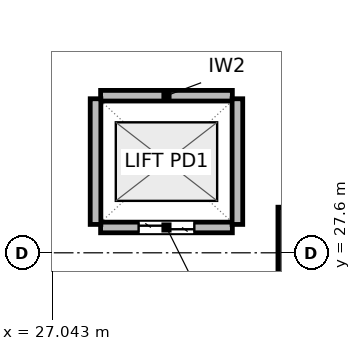
"""IFC4 building model, lengths in metres.
Left out: names, types, materials, properties, quantities, classifications, styles, units other than length and angle.
Written with IfcOpenShell. Run it as: python <this file> out.ifc"""

import sys

from ifc_helpers import new_model, si_unit, direction, frame, frame_2d, origin, origin_2d, place, context, subcontext, project, spatial, rectangle, extrude, element, fill, save


model = new_model("IFC4")
c1 = context("Model", 3, precision=1e-05, world=origin(), true_north=direction((0.0, 1.0)))
c2 = subcontext(c1, "Body", "Model", "MODEL_VIEW")
j1 = project(units=[si_unit("LENGTHUNIT", "METRE"), si_unit("PLANEANGLEUNIT", "RADIAN")], contexts=[c1])
p1 = place(None, origin())
s1 = spatial("IfcSite", under=j1, at=p1, CompositionType="ELEMENT")
p2 = place(p1, origin())
s2 = spatial("IfcBuilding", under=s1, at=p2, CompositionType="ELEMENT")
p3 = place(p2, frame((0.0, 0.0, 12.9)))
s3 = spatial("IfcBuildingStorey", under=s2, at=p3, CompositionType="ELEMENT", Elevation=12.9)
p4 = place(p3, frame((32.4, 27.6, 0.0), z_axis=(0.0, 0.0, 1.0), x_axis=(1.0, 0.0, 0.0)))
e1 = element("IfcColumn", 1, at=p4, inside=s3, PredefinedType="COLUMN", context=c2, shape_type="SweptSolid", body=[
    extrude(rectangle(XDim=1.8, YDim=1.8, at=origin_2d()), origin(), (0.0, 0.0, 1.0), 4.2),
])
p5 = place(p3, frame((28.0, 28.1, 0.0), z_axis=(0.0, 0.0, 1.0), x_axis=(1.0, 0.0, 0.0)))
e2 = element("IfcWall", 2, at=p5, inside=s3, PredefinedType="PARTITIONING", context=c2, shape_type="SweptSolid", body=[
    extrude(rectangle(XDim=2.6, YDim=0.21, at=frame_2d((1.3, 0.0))), origin(), (0.0, 0.0, 1.0), 3.84),
])
p6 = place(p5, frame((0.75, 0.0, 0.0)))
e3 = element("IfcOpeningElement", 3, at=p6, cuts=e2, PredefinedType="OPENING", context=c2, shape_type="SweptSolid", body=[
    extrude(rectangle(XDim=1.1, YDim=2.04, at=frame_2d((0.55, 1.02))), frame((0.0, 0.115, 0.0), z_axis=(0.0, -1.0, 0.0), x_axis=(1.0, 0.0, 0.0)), (0.0, 0.0, 1.0), 0.23),
])
p7 = place(p3, frame((28.0, 30.7, 0.0), z_axis=(0.0, 0.0, 1.0), x_axis=(1.0, 0.0, 0.0)))
e4 = element("IfcWall", 4, at=p7, inside=s3, PredefinedType="PARTITIONING", context=c2, shape_type="SweptSolid", body=[
    extrude(rectangle(XDim=2.6, YDim=0.21, at=frame_2d((1.3, 0.0))), origin(), (0.0, 0.0, 1.0), 3.84),
])
for number, where, z_axis, x_axis in (
    (5, (27.9, 28.16, 0.0), (0.0, 0.0, 1.0), (0.0, 1.0, 0.0)),
    (6, (30.7, 28.16, 0.0), (0.0, 0.0, 1.0), (0.0, 1.0, 0.0)),
):
    element("IfcWall", number, at=place(p3, frame(where, z_axis=z_axis, x_axis=x_axis)), inside=s3, PredefinedType="PARTITIONING", context=c2, shape_type="SweptSolid", body=[
        extrude(rectangle(XDim=2.48, YDim=0.21, at=frame_2d((1.24, 0.0))), origin(), (0.0, 0.0, 1.0), 3.84),
    ])
p8 = place(p6, origin())
e7 = element("IfcDoor", 7, at=p8, inside=s3, OperationType="DOUBLE_DOOR_SLIDING", PredefinedType="DOOR", context=c2, shape_type="SweptSolid", body=[
    extrude(rectangle(XDim=1.1, YDim=2.04, at=frame_2d((0.55, 1.02))), frame((0.0, 0.025, 0.0), z_axis=(0.0, -1.0, 0.0), x_axis=(1.0, 0.0, 0.0)), (0.0, 0.0, 1.0), 0.05),
])
fill(e3, e7)
save(model, sys.argv[1])
